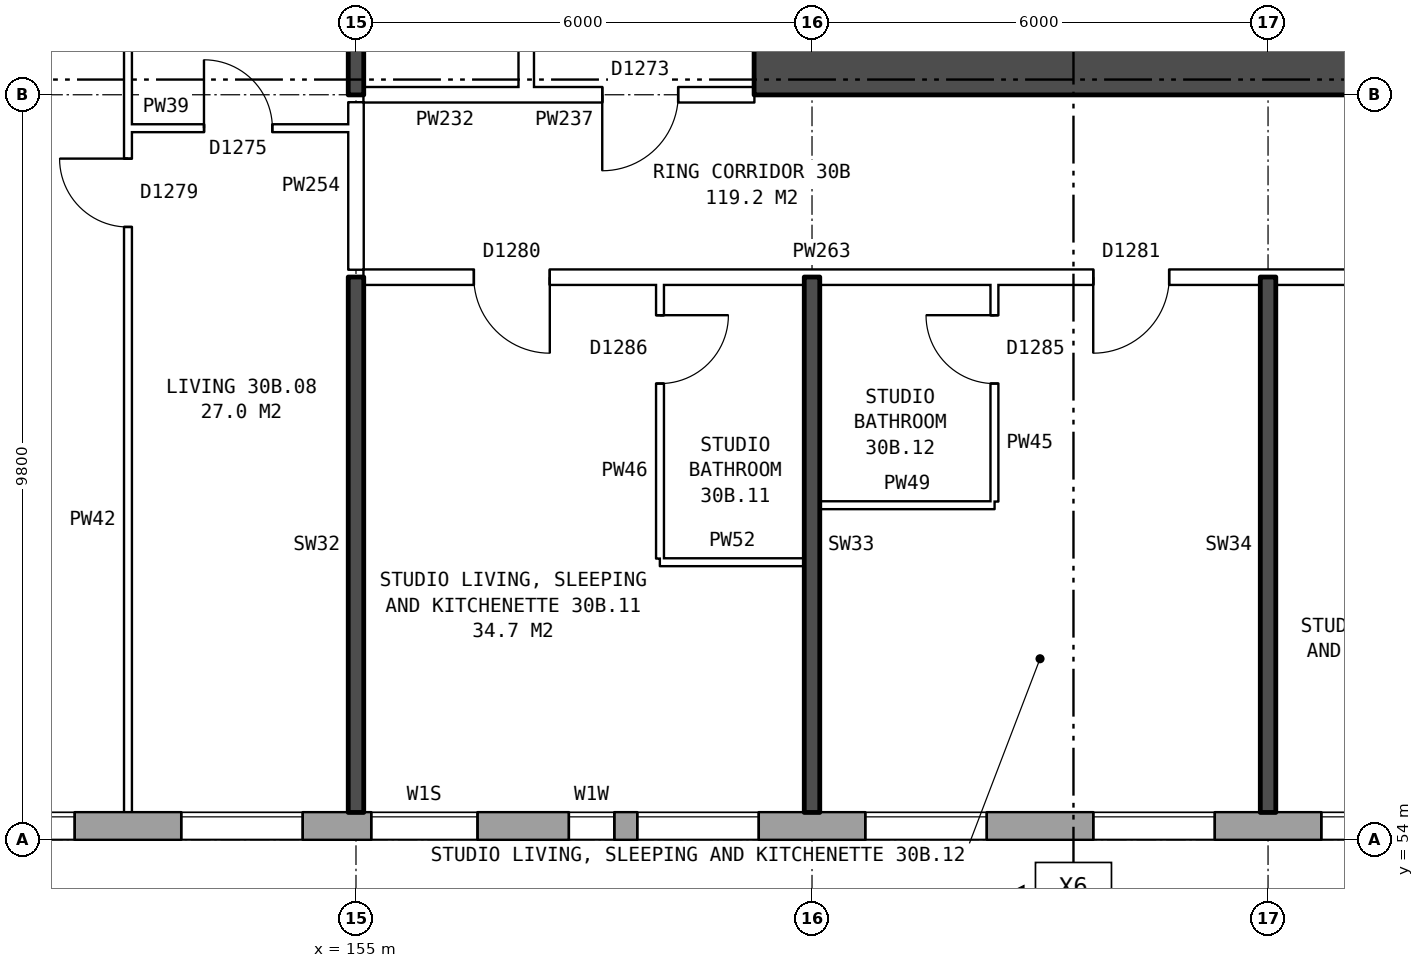
"""IFC4 building model, lengths in metres.
Left out: names, types, materials, properties, quantities, classifications, styles, units other than length and angle.
Written with IfcOpenShell. Run it as: python <this file> out.ifc"""

import sys

from ifc_helpers import new_model, si_unit, direction, frame, frame_2d, origin, place, context, subcontext, project, spatial, rectangle, extrude, element, fill, save


model = new_model("IFC4")
c1 = context("Model", 3, precision=1e-05, world=origin(), true_north=direction((0.0, 1.0)))
c2 = subcontext(c1, "Body", "Model", "MODEL_VIEW")
j1 = project(units=[si_unit("LENGTHUNIT", "METRE"), si_unit("PLANEANGLEUNIT", "RADIAN")], contexts=[c1])
p1 = place(None, origin())
s1 = spatial("IfcSite", under=j1, at=p1, CompositionType="ELEMENT")
p2 = place(p1, origin())
s2 = spatial("IfcBuilding", under=s1, at=p2, CompositionType="ELEMENT")
p3 = place(p2, frame((0.0, 0.0, 108.8)))
s3 = spatial("IfcBuildingStorey", under=s2, at=p3, CompositionType="ELEMENT", Elevation=108.8)
p4 = place(p3, frame((134.075, 54.18, 0.0), z_axis=(0.0, 0.0, 1.0), x_axis=(1.0, 0.0, 0.0)))
e1 = element("IfcWall", 1, at=p4, inside=s3, PredefinedType="STANDARD", context=c2, shape_type="SweptSolid", body=[
    extrude(rectangle(XDim=36.851, YDim=0.36, at=frame_2d((18.425, 0.0))), origin(), (0.0, 0.0, 1.0), 2.85),
])
p5 = place(p4, frame((0.625, 0.0, 0.8)))
e2 = element("IfcOpeningElement", 2, at=p5, cuts=e1, PredefinedType="OPENING", context=c2, shape_type="SweptSolid", body=[
    extrude(rectangle(XDim=1.6, YDim=1.8, at=frame_2d((0.8, 0.9))), frame((0.0, 0.19, 0.0), z_axis=(0.0, -1.0, 0.0), x_axis=(1.0, 0.0, 0.0)), (0.0, 0.0, 1.0), 0.38),
])
p6 = place(p4, frame((3.625, 0.0, 0.8)))
e3 = element("IfcOpeningElement", 3, at=p6, cuts=e1, PredefinedType="OPENING", context=c2, shape_type="SweptSolid", body=[
    extrude(rectangle(XDim=1.6, YDim=1.8, at=frame_2d((0.8, 0.9))), frame((0.0, 0.19, 0.0), z_axis=(0.0, -1.0, 0.0), x_axis=(1.0, 0.0, 0.0)), (0.0, 0.0, 1.0), 0.38),
])
p7 = place(p4, frame((6.625, 0.0, 0.8)))
e4 = element("IfcOpeningElement", 4, at=p7, cuts=e1, PredefinedType="OPENING", context=c2, shape_type="SweptSolid", body=[
    extrude(rectangle(XDim=1.6, YDim=1.8, at=frame_2d((0.8, 0.9))), frame((0.0, 0.19, 0.0), z_axis=(0.0, -1.0, 0.0), x_axis=(1.0, 0.0, 0.0)), (0.0, 0.0, 1.0), 0.38),
])
p8 = place(p4, frame((9.625, 0.0, 0.8)))
e5 = element("IfcOpeningElement", 5, at=p8, cuts=e1, PredefinedType="OPENING", context=c2, shape_type="SweptSolid", body=[
    extrude(rectangle(XDim=1.6, YDim=1.8, at=frame_2d((0.8, 0.9))), frame((0.0, 0.19, 0.0), z_axis=(0.0, -1.0, 0.0), x_axis=(1.0, 0.0, 0.0)), (0.0, 0.0, 1.0), 0.38),
])
p9 = place(p4, frame((12.075, 0.0, 1.65)))
e6 = element("IfcOpeningElement", 6, at=p9, cuts=e1, PredefinedType="OPENING", context=c2, shape_type="SweptSolid", body=[
    extrude(rectangle(XDim=1.0, YDim=0.9, at=frame_2d((0.5, 0.45))), frame((0.0, 0.19, 0.0), z_axis=(0.0, -1.0, 0.0), x_axis=(1.0, 0.0, 0.0)), (0.0, 0.0, 1.0), 0.38),
])
p10 = place(p4, frame((15.625, 0.0, 0.8)))
e7 = element("IfcOpeningElement", 7, at=p10, cuts=e1, PredefinedType="OPENING", context=c2, shape_type="SweptSolid", body=[
    extrude(rectangle(XDim=1.6, YDim=1.8, at=frame_2d((0.8, 0.9))), frame((0.0, 0.19, 0.0), z_axis=(0.0, -1.0, 0.0), x_axis=(1.0, 0.0, 0.0)), (0.0, 0.0, 1.0), 0.38),
])
p11 = place(p4, frame((18.625, 0.0, 0.8)))
e8 = element("IfcOpeningElement", 8, at=p11, cuts=e1, PredefinedType="OPENING", context=c2, shape_type="SweptSolid", body=[
    extrude(rectangle(XDim=1.6, YDim=1.8, at=frame_2d((0.8, 0.9))), frame((0.0, 0.19, 0.0), z_axis=(0.0, -1.0, 0.0), x_axis=(1.0, 0.0, 0.0)), (0.0, 0.0, 1.0), 0.38),
])
p12 = place(p4, frame((21.125, 0.0, 0.8)))
e9 = element("IfcOpeningElement", 9, at=p12, cuts=e1, PredefinedType="OPENING", context=c2, shape_type="SweptSolid", body=[
    extrude(rectangle(XDim=1.4, YDim=0.9, at=frame_2d((0.7, 0.45))), frame((0.0, 0.19, 0.0), z_axis=(0.0, -1.0, 0.0), x_axis=(1.0, 0.0, 0.0)), (0.0, 0.0, 1.0), 0.38),
])
p13 = place(p4, frame((24.625, 0.0, 0.8)))
e10 = element("IfcOpeningElement", 10, at=p13, cuts=e1, PredefinedType="OPENING", context=c2, shape_type="SweptSolid", body=[
    extrude(rectangle(XDim=1.6, YDim=1.8, at=frame_2d((0.8, 0.9))), frame((0.0, 0.19, 0.0), z_axis=(0.0, -1.0, 0.0), x_axis=(1.0, 0.0, 0.0)), (0.0, 0.0, 1.0), 0.38),
])
p14 = place(p4, frame((27.625, 0.0, 0.8)))
e11 = element("IfcOpeningElement", 11, at=p14, cuts=e1, PredefinedType="OPENING", context=c2, shape_type="SweptSolid", body=[
    extrude(rectangle(XDim=1.6, YDim=1.8, at=frame_2d((0.8, 0.9))), frame((0.0, 0.19, 0.0), z_axis=(0.0, -1.0, 0.0), x_axis=(1.0, 0.0, 0.0)), (0.0, 0.0, 1.0), 0.38),
])
p15 = place(p4, frame((30.625, 0.0, 0.8)))
e12 = element("IfcOpeningElement", 12, at=p15, cuts=e1, PredefinedType="OPENING", context=c2, shape_type="SweptSolid", body=[
    extrude(rectangle(XDim=1.6, YDim=1.8, at=frame_2d((0.8, 0.9))), frame((0.0, 0.19, 0.0), z_axis=(0.0, -1.0, 0.0), x_axis=(1.0, 0.0, 0.0)), (0.0, 0.0, 1.0), 0.38),
])
p16 = place(p4, frame((33.625, 0.0, 0.8)))
e13 = element("IfcOpeningElement", 13, at=p16, cuts=e1, PredefinedType="OPENING", context=c2, shape_type="SweptSolid", body=[
    extrude(rectangle(XDim=1.6, YDim=1.8, at=frame_2d((0.8, 0.9))), frame((0.0, 0.19, 0.0), z_axis=(0.0, -1.0, 0.0), x_axis=(1.0, 0.0, 0.0)), (0.0, 0.0, 1.0), 0.38),
])
p17 = place(p4, frame((13.525, 0.0, 0.15)))
e14 = element("IfcOpeningElement", 14, at=p17, cuts=e1, PredefinedType="OPENING", context=c2, shape_type="SweptSolid", body=[
    extrude(rectangle(XDim=1.2, YDim=0.9, at=frame_2d((0.6, 0.45))), frame((0.0, 0.19, 0.0), z_axis=(0.0, -1.0, 0.0), x_axis=(1.0, 0.0, 0.0)), (0.0, 0.0, 1.0), 0.38),
])
p18 = place(p4, frame((23.725, 0.0, 1.7)))
e15 = element("IfcOpeningElement", 15, at=p18, cuts=e1, PredefinedType="OPENING", context=c2, shape_type="SweptSolid", body=[
    extrude(rectangle(XDim=0.6, YDim=0.9, at=frame_2d((0.3, 0.45))), frame((0.0, 0.19, 0.0), z_axis=(0.0, -1.0, 0.0), x_axis=(1.0, 0.0, 0.0)), (0.0, 0.0, 1.0), 0.38),
])
p19 = place(p3, frame((160.24, 64.125, 0.0), z_axis=(0.0, 0.0, 1.0), x_axis=(1.0, 0.0, 0.0)))
e16 = element("IfcWall", 16, at=p19, inside=s3, PredefinedType="SHEAR", context=c2, shape_type="SweptSolid", body=[
    extrude(rectangle(XDim=8.4, YDim=0.65, at=frame_2d((4.2, 0.0))), origin(), (0.0, 0.0, 1.0), 2.85),
])
p20 = place(p3, frame((157.24, 63.9, 0.0), z_axis=(0.0, 0.0, 1.0), x_axis=(0.0, 1.0, 0.0)))
e17 = element("IfcWall", 17, at=p20, inside=s3, PredefinedType="PARTITIONING", context=c2, shape_type="SweptSolid", body=[
    extrude(rectangle(XDim=12.2, YDim=0.2, at=frame_2d((6.1, 0.0))), origin(), (0.0, 0.0, 1.0), 2.85),
])
p21 = place(p20, frame((5.1, 0.0, 0.0)))
e18 = element("IfcOpeningElement", 18, at=p21, cuts=e17, PredefinedType="OPENING", context=c2, shape_type="SweptSolid", body=[
    extrude(rectangle(XDim=2.0, YDim=2.1, at=frame_2d((1.0, 1.05))), frame((0.0, 0.11, 0.0), z_axis=(0.0, -1.0, 0.0), x_axis=(1.0, 0.0, 0.0)), (0.0, 0.0, 1.0), 0.22),
])
p22 = place(p3, frame((159.0, 57.65, 0.0), z_axis=(0.0, 0.0, 1.0), x_axis=(1.0, 0.0, 0.0)))
e19 = element("IfcWall", 19, at=p22, inside=s3, PredefinedType="PARTITIONING", context=c2, shape_type="SweptSolid", body=[
    extrude(rectangle(XDim=1.9, YDim=0.1, at=frame_2d((0.95, 0.0))), origin(), (0.0, 0.0, 1.0), 2.85),
])
p23 = place(p3, frame((161.1, 58.4, 0.0), z_axis=(0.0, 0.0, 1.0), x_axis=(1.0, 0.0, 0.0)))
e20 = element("IfcWall", 20, at=p23, inside=s3, PredefinedType="PARTITIONING", context=c2, shape_type="SweptSolid", body=[
    extrude(rectangle(XDim=2.3, YDim=0.1, at=frame_2d((1.15, 0.0))), origin(), (0.0, 0.0, 1.0), 2.85),
])
p24 = place(p3, frame((155.1, 61.4, 0.0), z_axis=(0.0, 0.0, 1.0), x_axis=(1.0, 0.0, 0.0)))
e21 = element("IfcWall", 21, at=p24, inside=s3, PredefinedType="PARTITIONING", context=c2, shape_type="SweptSolid", body=[
    extrude(rectangle(XDim=18.54, YDim=0.2, at=frame_2d((9.27, 0.0))), origin(), (0.0, 0.0, 1.0), 2.85),
])
p25 = place(p24, frame((1.45, 0.0, 0.0)))
e22 = element("IfcOpeningElement", 22, at=p25, cuts=e21, PredefinedType="OPENING", context=c2, shape_type="SweptSolid", body=[
    extrude(rectangle(XDim=1.0, YDim=2.1, at=frame_2d((0.5, 1.05))), frame((0.0, 0.11, 0.0), z_axis=(0.0, -1.0, 0.0), x_axis=(1.0, 0.0, 0.0)), (0.0, 0.0, 1.0), 0.22),
])
p26 = place(p24, frame((9.6, 0.0, 0.0)))
e23 = element("IfcOpeningElement", 23, at=p26, cuts=e21, PredefinedType="OPENING", context=c2, shape_type="SweptSolid", body=[
    extrude(rectangle(XDim=1.0, YDim=2.1, at=frame_2d((0.5, 1.05))), frame((0.0, 0.11, 0.0), z_axis=(0.0, -1.0, 0.0), x_axis=(1.0, 0.0, 0.0)), (0.0, 0.0, 1.0), 0.22),
])
p27 = place(p24, frame((13.4, 0.0, 0.0)))
e24 = element("IfcOpeningElement", 24, at=p27, cuts=e21, PredefinedType="OPENING", context=c2, shape_type="SweptSolid", body=[
    extrude(rectangle(XDim=1.0, YDim=2.1, at=frame_2d((0.5, 1.05))), frame((0.0, 0.11, 0.0), z_axis=(0.0, -1.0, 0.0), x_axis=(1.0, 0.0, 0.0)), (0.0, 0.0, 1.0), 0.22),
])
p28 = place(p3, frame((152.0, 63.36, 0.0), z_axis=(0.0, 0.0, 1.0), x_axis=(1.0, 0.0, 0.0)))
e25 = element("IfcWall", 25, at=p28, inside=s3, PredefinedType="PARTITIONING", context=c2, shape_type="SweptSolid", body=[
    extrude(rectangle(XDim=2.9, YDim=0.1, at=frame_2d((1.45, 0.0))), origin(), (0.0, 0.0, 1.0), 2.85),
])
p29 = place(p28, frame((1.0, 0.0, 0.0)))
e26 = element("IfcOpeningElement", 26, at=p29, cuts=e25, PredefinedType="OPENING", context=c2, shape_type="SweptSolid", body=[
    extrude(rectangle(XDim=0.9, YDim=2.1, at=frame_2d((0.45, 1.05))), frame((0.0, 0.06, 0.0), z_axis=(0.0, -1.0, 0.0), x_axis=(1.0, 0.0, 0.0)), (0.0, 0.0, 1.0), 0.12),
])
p30 = place(p3, frame((155.1, 63.8, 0.0), z_axis=(0.0, 0.0, 1.0), x_axis=(1.0, 0.0, 0.0)))
e27 = element("IfcWall", 27, at=p30, inside=s3, PredefinedType="PARTITIONING", context=c2, shape_type="SweptSolid", body=[
    extrude(rectangle(XDim=2.14, YDim=0.2, at=frame_2d((1.07, 0.0))), origin(), (0.0, 0.0, 1.0), 2.85),
])
p31 = place(p3, frame((157.24, 63.8, 0.0), z_axis=(0.0, 0.0, 1.0), x_axis=(1.0, 0.0, 0.0)))
e28 = element("IfcWall", 28, at=p31, inside=s3, PredefinedType="PARTITIONING", context=c2, shape_type="SweptSolid", body=[
    extrude(rectangle(XDim=3.0, YDim=0.2, at=frame_2d((1.5, 0.0))), origin(), (0.0, 0.0, 1.0), 2.85),
])
p32 = place(p31, frame((1.0, 0.0, 0.0)))
e29 = element("IfcOpeningElement", 29, at=p32, cuts=e28, PredefinedType="OPENING", context=c2, shape_type="SweptSolid", body=[
    extrude(rectangle(XDim=1.0, YDim=2.1, at=frame_2d((0.5, 1.05))), frame((0.0, 0.11, 0.0), z_axis=(0.0, -1.0, 0.0), x_axis=(1.0, 0.0, 0.0)), (0.0, 0.0, 1.0), 0.22),
])
p33 = place(p3, frame((152.0, 54.36, 0.0), z_axis=(0.0, 0.0, 1.0), x_axis=(0.0, 1.0, 0.0)))
e30 = element("IfcWall", 30, at=p33, inside=s3, PredefinedType="PARTITIONING", context=c2, shape_type="SweptSolid", body=[
    extrude(rectangle(XDim=14.34, YDim=0.1, at=frame_2d((7.17, 0.0))), origin(), (0.0, 0.0, 1.0), 2.85),
])
p34 = place(p33, frame((7.7, 0.0, 0.0)))
e31 = element("IfcOpeningElement", 31, at=p34, cuts=e30, PredefinedType="OPENING", context=c2, shape_type="SweptSolid", body=[
    extrude(rectangle(XDim=0.9, YDim=2.1, at=frame_2d((0.45, 1.05))), frame((0.0, 0.06, 0.0), z_axis=(0.0, -1.0, 0.0), x_axis=(1.0, 0.0, 0.0)), (0.0, 0.0, 1.0), 0.12),
])
p35 = place(p33, frame((13.04, 0.0, 0.0)))
e32 = element("IfcOpeningElement", 32, at=p35, cuts=e30, PredefinedType="OPENING", context=c2, shape_type="SweptSolid", body=[
    extrude(rectangle(XDim=0.9, YDim=2.1, at=frame_2d((0.45, 1.05))), frame((0.0, 0.06, 0.0), z_axis=(0.0, -1.0, 0.0), x_axis=(1.0, 0.0, 0.0)), (0.0, 0.0, 1.0), 0.12),
])
p36 = place(p3, frame((155.0, 54.36, 0.0), z_axis=(0.0, 0.0, 1.0), x_axis=(0.0, 1.0, 0.0)))
e33 = element("IfcWall", 33, at=p36, inside=s3, PredefinedType="SOLIDWALL", context=c2, shape_type="SweptSolid", body=[
    extrude(rectangle(XDim=7.04, YDim=0.2, at=frame_2d((3.52, 0.0))), origin(), (0.0, 0.0, 1.0), 2.85),
])
p37 = place(p3, frame((155.0, 61.5, 0.0), z_axis=(0.0, 0.0, 1.0), x_axis=(0.0, 1.0, 0.0)))
e34 = element("IfcWall", 34, at=p37, inside=s3, PredefinedType="PARTITIONING", context=c2, shape_type="SweptSolid", body=[
    extrude(rectangle(XDim=2.2, YDim=0.2, at=frame_2d((1.1, 0.0))), origin(), (0.0, 0.0, 1.0), 2.85),
])
p38 = place(p3, frame((155.0, 63.8, 0.0), z_axis=(0.0, 0.0, 1.0), x_axis=(0.0, 1.0, 0.0)))
e35 = element("IfcWall", 35, at=p38, inside=s3, PredefinedType="SOLIDWALL", context=c2, shape_type="SweptSolid", body=[
    extrude(rectangle(XDim=5.0, YDim=0.2, at=frame_2d((2.5, 0.0))), origin(), (0.0, 0.0, 1.0), 2.85),
])
p39 = place(p3, frame((159.0, 57.7, 0.0), z_axis=(0.0, 0.0, 1.0), x_axis=(0.0, 1.0, 0.0)))
e36 = element("IfcWall", 36, at=p39, inside=s3, PredefinedType="PARTITIONING", context=c2, shape_type="SweptSolid", body=[
    extrude(rectangle(XDim=3.6, YDim=0.1, at=frame_2d((1.8, 0.0))), origin(), (0.0, 0.0, 1.0), 2.85),
])
p40 = place(p39, frame((2.3, 0.0, 0.0)))
e37 = element("IfcOpeningElement", 37, at=p40, cuts=e36, PredefinedType="OPENING", context=c2, shape_type="SweptSolid", body=[
    extrude(rectangle(XDim=0.9, YDim=2.1, at=frame_2d((0.45, 1.05))), frame((0.0, 0.06, 0.0), z_axis=(0.0, -1.0, 0.0), x_axis=(1.0, 0.0, 0.0)), (0.0, 0.0, 1.0), 0.12),
])
p41 = place(p3, frame((161.0, 54.36, 0.0), z_axis=(0.0, 0.0, 1.0), x_axis=(0.0, 1.0, 0.0)))
e38 = element("IfcWall", 38, at=p41, inside=s3, PredefinedType="SOLIDWALL", context=c2, shape_type="SweptSolid", body=[
    extrude(rectangle(XDim=7.04, YDim=0.2, at=frame_2d((3.52, 0.0))), origin(), (0.0, 0.0, 1.0), 2.85),
])
p42 = place(p3, frame((163.4, 58.45, 0.0), z_axis=(0.0, 0.0, 1.0), x_axis=(0.0, 1.0, 0.0)))
e39 = element("IfcWall", 39, at=p42, inside=s3, PredefinedType="PARTITIONING", context=c2, shape_type="SweptSolid", body=[
    extrude(rectangle(XDim=2.85, YDim=0.1, at=frame_2d((1.425, 0.0))), origin(), (0.0, 0.0, 1.0), 2.85),
])
p43 = place(p42, frame((1.55, 0.0, 0.0)))
e40 = element("IfcOpeningElement", 40, at=p43, cuts=e39, PredefinedType="OPENING", context=c2, shape_type="SweptSolid", body=[
    extrude(rectangle(XDim=0.9, YDim=2.1, at=frame_2d((0.45, 1.05))), frame((0.0, 0.06, 0.0), z_axis=(0.0, -1.0, 0.0), x_axis=(1.0, 0.0, 0.0)), (0.0, 0.0, 1.0), 0.12),
])
p44 = place(p3, frame((167.0, 54.36, 0.0), z_axis=(0.0, 0.0, 1.0), x_axis=(0.0, 1.0, 0.0)))
e41 = element("IfcWall", 41, at=p44, inside=s3, PredefinedType="SOLIDWALL", context=c2, shape_type="SweptSolid", body=[
    extrude(rectangle(XDim=7.04, YDim=0.2, at=frame_2d((3.52, 0.0))), origin(), (0.0, 0.0, 1.0), 2.85),
])
p45 = place(p10, origin())
e42 = element("IfcWindow", 42, at=p45, inside=s3, PartitioningType="SINGLE_PANEL", PredefinedType="WINDOW", context=c2, shape_type="SweptSolid", body=[
    extrude(rectangle(XDim=1.6, YDim=1.8, at=frame_2d((0.8, 0.9))), frame((0.0, 0.15, 0.0), z_axis=(0.0, -1.0, 0.0), x_axis=(1.0, 0.0, 0.0)), (0.0, 0.0, 1.0), 0.06),
])
fill(e7, e42)
p46 = place(p11, origin())
e43 = element("IfcWindow", 43, at=p46, inside=s3, PartitioningType="SINGLE_PANEL", PredefinedType="WINDOW", context=c2, shape_type="SweptSolid", body=[
    extrude(rectangle(XDim=1.6, YDim=1.8, at=frame_2d((0.8, 0.9))), frame((0.0, 0.15, 0.0), z_axis=(0.0, -1.0, 0.0), x_axis=(1.0, 0.0, 0.0)), (0.0, 0.0, 1.0), 0.06),
])
fill(e8, e43)
p47 = place(p12, origin())
e44 = element("IfcWindow", 44, at=p47, inside=s3, PartitioningType="SINGLE_PANEL", PredefinedType="WINDOW", context=c2, shape_type="SweptSolid", body=[
    extrude(rectangle(XDim=1.4, YDim=0.9, at=frame_2d((0.7, 0.45))), frame((0.0, 0.15, 0.0), z_axis=(0.0, -1.0, 0.0), x_axis=(1.0, 0.0, 0.0)), (0.0, 0.0, 1.0), 0.06),
])
fill(e9, e44)
p48 = place(p13, origin())
e45 = element("IfcWindow", 45, at=p48, inside=s3, PartitioningType="SINGLE_PANEL", PredefinedType="WINDOW", context=c2, shape_type="SweptSolid", body=[
    extrude(rectangle(XDim=1.6, YDim=1.8, at=frame_2d((0.8, 0.9))), frame((0.0, 0.15, 0.0), z_axis=(0.0, -1.0, 0.0), x_axis=(1.0, 0.0, 0.0)), (0.0, 0.0, 1.0), 0.06),
])
fill(e10, e45)
p49 = place(p14, origin())
e46 = element("IfcWindow", 46, at=p49, inside=s3, PartitioningType="SINGLE_PANEL", PredefinedType="WINDOW", context=c2, shape_type="SweptSolid", body=[
    extrude(rectangle(XDim=1.6, YDim=1.8, at=frame_2d((0.8, 0.9))), frame((0.0, 0.15, 0.0), z_axis=(0.0, -1.0, 0.0), x_axis=(1.0, 0.0, 0.0)), (0.0, 0.0, 1.0), 0.06),
])
fill(e11, e46)
p50 = place(p15, origin())
e47 = element("IfcWindow", 47, at=p50, inside=s3, PartitioningType="SINGLE_PANEL", PredefinedType="WINDOW", context=c2, shape_type="SweptSolid", body=[
    extrude(rectangle(XDim=1.6, YDim=1.8, at=frame_2d((0.8, 0.9))), frame((0.0, 0.15, 0.0), z_axis=(0.0, -1.0, 0.0), x_axis=(1.0, 0.0, 0.0)), (0.0, 0.0, 1.0), 0.06),
])
fill(e12, e47)
p51 = place(p16, origin())
e48 = element("IfcWindow", 48, at=p51, inside=s3, PartitioningType="SINGLE_PANEL", PredefinedType="WINDOW", context=c2, shape_type="SweptSolid", body=[
    extrude(rectangle(XDim=1.6, YDim=1.8, at=frame_2d((0.8, 0.9))), frame((0.0, 0.15, 0.0), z_axis=(0.0, -1.0, 0.0), x_axis=(1.0, 0.0, 0.0)), (0.0, 0.0, 1.0), 0.06),
])
fill(e13, e48)
p52 = place(p32, frame((1.0, 0.0, 0.0), z_axis=(0.0, 0.0, 1.0), x_axis=(-1.0, 0.0, 0.0)))
e49 = element("IfcDoor", 49, at=p52, inside=s3, OperationType="SINGLE_SWING_RIGHT", PredefinedType="DOOR", context=c2, shape_type="SweptSolid", body=[
    extrude(rectangle(XDim=1.0, YDim=2.1, at=frame_2d((0.5, 1.05))), frame((0.0, 0.025, 0.0), z_axis=(0.0, -1.0, 0.0), x_axis=(1.0, 0.0, 0.0)), (0.0, 0.0, 1.0), 0.05),
])
fill(e29, e49)
p53 = place(p34, origin())
e50 = element("IfcDoor", 50, at=p53, inside=s3, OperationType="SINGLE_SWING_RIGHT", PredefinedType="DOOR", context=c2, shape_type="SweptSolid", body=[
    extrude(rectangle(XDim=0.9, YDim=2.1, at=frame_2d((0.45, 1.05))), frame((0.0, 0.025, 0.0), z_axis=(0.0, -1.0, 0.0), x_axis=(1.0, 0.0, 0.0)), (0.0, 0.0, 1.0), 0.05),
])
fill(e31, e50)
p54 = place(p29, origin())
e51 = element("IfcDoor", 51, at=p54, inside=s3, OperationType="SINGLE_SWING_LEFT", PredefinedType="DOOR", context=c2, shape_type="SweptSolid", body=[
    extrude(rectangle(XDim=0.9, YDim=2.1, at=frame_2d((0.45, 1.05))), frame((0.0, 0.025, 0.0), z_axis=(0.0, -1.0, 0.0), x_axis=(1.0, 0.0, 0.0)), (0.0, 0.0, 1.0), 0.05),
])
fill(e26, e51)
p55 = place(p25, frame((1.0, 0.0, 0.0), z_axis=(0.0, 0.0, 1.0), x_axis=(-1.0, 0.0, 0.0)))
e52 = element("IfcDoor", 52, at=p55, inside=s3, OperationType="SINGLE_SWING_LEFT", PredefinedType="DOOR", context=c2, shape_type="SweptSolid", body=[
    extrude(rectangle(XDim=1.0, YDim=2.1, at=frame_2d((0.5, 1.05))), frame((0.0, 0.025, 0.0), z_axis=(0.0, -1.0, 0.0), x_axis=(1.0, 0.0, 0.0)), (0.0, 0.0, 1.0), 0.05),
])
fill(e22, e52)
p56 = place(p40, frame((0.9, 0.0, 0.0), z_axis=(0.0, 0.0, 1.0), x_axis=(-1.0, 0.0, 0.0)))
e53 = element("IfcDoor", 53, at=p56, inside=s3, OperationType="SINGLE_SWING_LEFT", PredefinedType="DOOR", context=c2, shape_type="SweptSolid", body=[
    extrude(rectangle(XDim=0.9, YDim=2.1, at=frame_2d((0.45, 1.05))), frame((0.0, 0.025, 0.0), z_axis=(0.0, -1.0, 0.0), x_axis=(1.0, 0.0, 0.0)), (0.0, 0.0, 1.0), 0.05),
])
fill(e37, e53)
p57 = place(p26, frame((1.0, 0.0, 0.0), z_axis=(0.0, 0.0, 1.0), x_axis=(-1.0, 0.0, 0.0)))
e54 = element("IfcDoor", 54, at=p57, inside=s3, OperationType="SINGLE_SWING_RIGHT", PredefinedType="DOOR", context=c2, shape_type="SweptSolid", body=[
    extrude(rectangle(XDim=1.0, YDim=2.1, at=frame_2d((0.5, 1.05))), frame((0.0, 0.025, 0.0), z_axis=(0.0, -1.0, 0.0), x_axis=(1.0, 0.0, 0.0)), (0.0, 0.0, 1.0), 0.05),
])
fill(e23, e54)
p58 = place(p43, origin())
e55 = element("IfcDoor", 55, at=p58, inside=s3, OperationType="SINGLE_SWING_RIGHT", PredefinedType="DOOR", context=c2, shape_type="SweptSolid", body=[
    extrude(rectangle(XDim=0.9, YDim=2.1, at=frame_2d((0.45, 1.05))), frame((0.0, 0.025, 0.0), z_axis=(0.0, -1.0, 0.0), x_axis=(1.0, 0.0, 0.0)), (0.0, 0.0, 1.0), 0.05),
])
fill(e40, e55)
p59 = place(p18, origin())
e56 = element("IfcWindow", 56, at=p59, inside=s3, PartitioningType="SINGLE_PANEL", PredefinedType="WINDOW", context=c2, shape_type="SweptSolid", body=[
    extrude(rectangle(XDim=0.6, YDim=0.9, at=frame_2d((0.3, 0.45))), frame((0.0, 0.15, 0.0), z_axis=(0.0, -1.0, 0.0), x_axis=(1.0, 0.0, 0.0)), (0.0, 0.0, 1.0), 0.06),
])
fill(e15, e56)
save(model, sys.argv[1])
